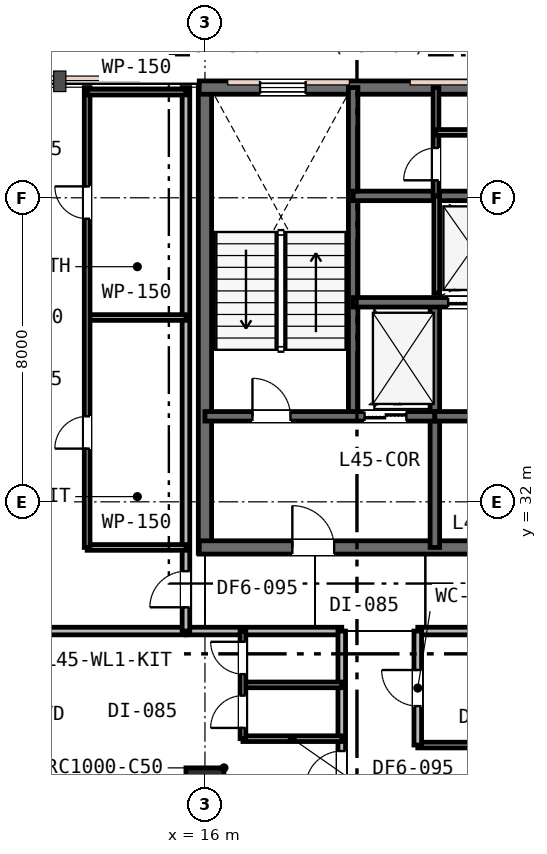
"""IFC4 building model, lengths in metres.
Left out: names, types, materials, properties, quantities, classifications, styles, units other than length and angle.
Written with IfcOpenShell. Run it as: python <this file> out.ifc"""

import sys

from ifc_helpers import new_model, si_unit, direction, frame, frame_2d, origin, origin_2d, place, context, subcontext, project, spatial, rectangle, extrude, element, fill, save


model = new_model("IFC4")
c1 = context("Model", 3, precision=1e-05, world=origin(), true_north=direction((0.0, 1.0)))
c2 = subcontext(c1, "Body", "Model", "MODEL_VIEW")
j1 = project(units=[si_unit("LENGTHUNIT", "METRE"), si_unit("PLANEANGLEUNIT", "RADIAN")], contexts=[c1])
p1 = place(None, origin())
s1 = spatial("IfcSite", under=j1, at=p1, CompositionType="ELEMENT")
p2 = place(p1, origin())
s2 = spatial("IfcBuilding", under=s1, at=p2, CompositionType="ELEMENT")
p3 = place(p2, frame((0.0, 0.0, 175.8)))
s3 = spatial("IfcBuildingStorey", under=s2, at=p3, CompositionType="ELEMENT", Elevation=175.8)
p4 = place(p3, frame((16.0, 30.65, 0.0), z_axis=(0.0, 0.0, 1.0), x_axis=(0.0, 1.0, 0.0)))
e1 = element("IfcWall", 1, at=p4, inside=s3, PredefinedType="SHEAR", context=c2, shape_type="SweptSolid", body=[
    extrude(rectangle(XDim=12.3, YDim=0.35, at=frame_2d((6.15, 0.0))), origin(), (0.0, 0.0, 1.0), 3.6),
])
p5 = place(p3, frame((15.85, 42.9, 0.0), z_axis=(0.0, 0.0, 1.0), x_axis=(1.0, 0.0, 0.0)))
e2 = element("IfcWall", 2, at=p5, inside=s3, PredefinedType="SHEAR", context=c2, shape_type="SweptSolid", body=[
    extrude(rectangle(XDim=24.3, YDim=0.35, at=frame_2d((12.15, 0.0))), origin(), (0.0, 0.0, 1.0), 3.6),
])
p6 = place(p5, frame((1.6, 0.0, 0.95)))
e3 = element("IfcOpeningElement", 3, at=p6, cuts=e2, PredefinedType="OPENING", context=c2, shape_type="SweptSolid", body=[
    extrude(rectangle(XDim=1.2, YDim=1.6, at=frame_2d((0.6, 0.8))), frame((0.0, 0.185, 0.0), z_axis=(0.0, -1.0, 0.0), x_axis=(1.0, 0.0, 0.0)), (0.0, 0.0, 1.0), 0.37),
])
p7 = place(p5, frame((16.5, 0.0, 0.95)))
e4 = element("IfcOpeningElement", 4, at=p7, cuts=e2, PredefinedType="OPENING", context=c2, shape_type="SweptSolid", body=[
    extrude(rectangle(XDim=1.2, YDim=1.6, at=frame_2d((0.6, 0.8))), frame((0.0, 0.185, 0.0), z_axis=(0.0, -1.0, 0.0), x_axis=(1.0, 0.0, 0.0)), (0.0, 0.0, 1.0), 0.37),
])
p8 = place(p5, frame((21.6, 0.0, 0.95)))
e5 = element("IfcOpeningElement", 5, at=p8, cuts=e2, PredefinedType="OPENING", context=c2, shape_type="SweptSolid", body=[
    extrude(rectangle(XDim=1.2, YDim=1.6, at=frame_2d((0.6, 0.8))), frame((0.0, 0.185, 0.0), z_axis=(0.0, -1.0, 0.0), x_axis=(1.0, 0.0, 0.0)), (0.0, 0.0, 1.0), 0.37),
])
p9 = place(p3, frame((15.85, 30.8, 0.0), z_axis=(0.0, 0.0, 1.0), x_axis=(1.0, 0.0, 0.0)))
e6 = element("IfcWall", 6, at=p9, inside=s3, PredefinedType="SHEAR", context=c2, shape_type="SweptSolid", body=[
    extrude(rectangle(XDim=11.2, YDim=0.35, at=frame_2d((5.6, 0.0))), origin(), (0.0, 0.0, 1.0), 3.6),
])
p10 = place(p9, frame((2.45, 0.0, 0.0)))
e7 = element("IfcOpeningElement", 7, at=p10, cuts=e6, PredefinedType="OPENING", context=c2, shape_type="SweptSolid", body=[
    extrude(rectangle(XDim=1.1, YDim=2.15, at=frame_2d((0.55, 1.075))), frame((0.0, 0.185, 0.0), z_axis=(0.0, -1.0, 0.0), x_axis=(1.0, 0.0, 0.0)), (0.0, 0.0, 1.0), 0.37),
])
p11 = place(p3, frame((19.9, 34.25, 0.0), z_axis=(0.0, 0.0, 1.0), x_axis=(0.0, 1.0, 0.0)))
e8 = element("IfcWall", 8, at=p11, inside=s3, PredefinedType="SHEAR", context=c2, shape_type="SweptSolid", body=[
    extrude(rectangle(XDim=8.65, YDim=0.25, at=frame_2d((4.325, 0.0))), origin(), (0.0, 0.0, 1.0), 3.6),
])
p12 = place(p3, frame((22.05, 30.8, 0.0), z_axis=(0.0, 0.0, 1.0), x_axis=(0.0, 1.0, 0.0)))
e9 = element("IfcWall", 9, at=p12, inside=s3, PredefinedType="SHEAR", context=c2, shape_type="SweptSolid", body=[
    extrude(rectangle(XDim=6.45, YDim=0.25, at=frame_2d((3.225, 0.0))), origin(), (0.0, 0.0, 1.0), 3.6),
])
p13 = place(p3, frame((16.0, 34.25, 0.0), z_axis=(0.0, 0.0, 1.0), x_axis=(1.0, 0.0, 0.0)))
e10 = element("IfcWall", 10, at=p13, inside=s3, PredefinedType="SHEAR", context=c2, shape_type="SweptSolid", body=[
    extrude(rectangle(XDim=6.05, YDim=0.25, at=frame_2d((3.025, 0.0))), origin(), (0.0, 0.0, 1.0), 3.6),
])
p14 = place(p13, frame((1.25, 0.0, 0.0)))
e11 = element("IfcOpeningElement", 11, at=p14, cuts=e10, PredefinedType="OPENING", context=c2, shape_type="SweptSolid", body=[
    extrude(rectangle(XDim=1.0, YDim=2.15, at=frame_2d((0.5, 1.075))), frame((0.0, 0.135, 0.0), z_axis=(0.0, -1.0, 0.0), x_axis=(1.0, 0.0, 0.0)), (0.0, 0.0, 1.0), 0.27),
])
p15 = place(p13, frame((4.2, 0.0, 0.0)))
e12 = element("IfcOpeningElement", 12, at=p15, cuts=e10, PredefinedType="OPENING", context=c2, shape_type="SweptSolid", body=[
    extrude(rectangle(XDim=1.1, YDim=2.15, at=frame_2d((0.55, 1.075))), frame((0.0, 0.135, 0.0), z_axis=(0.0, -1.0, 0.0), x_axis=(1.0, 0.0, 0.0)), (0.0, 0.0, 1.0), 0.27),
])
p16 = place(p3, frame((22.05, 34.25, 0.0), z_axis=(0.0, 0.0, 1.0), x_axis=(1.0, 0.0, 0.0)))
e13 = element("IfcWall", 13, at=p16, inside=s3, PredefinedType="SHEAR", context=c2, shape_type="SweptSolid", body=[
    extrude(rectangle(XDim=5.0, YDim=0.25, at=frame_2d((2.5, 0.0))), origin(), (0.0, 0.0, 1.0), 3.6),
])
p17 = place(p16, frame((1.95, 0.0, 0.0)))
e14 = element("IfcOpeningElement", 14, at=p17, cuts=e13, PredefinedType="OPENING", context=c2, shape_type="SweptSolid", body=[
    extrude(rectangle(XDim=1.0, YDim=2.15, at=frame_2d((0.5, 1.075))), frame((0.0, 0.135, 0.0), z_axis=(0.0, -1.0, 0.0), x_axis=(1.0, 0.0, 0.0)), (0.0, 0.0, 1.0), 0.27),
])
p18 = place(p3, frame((19.9, 37.25, 0.0), z_axis=(0.0, 0.0, 1.0), x_axis=(1.0, 0.0, 0.0)))
e15 = element("IfcWall", 15, at=p18, inside=s3, PredefinedType="SHEAR", context=c2, shape_type="SweptSolid", body=[
    extrude(rectangle(XDim=16.2, YDim=0.25, at=frame_2d((8.1, 0.0))), origin(), (0.0, 0.0, 1.0), 3.6),
])
p19 = place(p18, frame((12.55, 0.0, 0.0)))
e16 = element("IfcOpeningElement", 16, at=p19, cuts=e15, PredefinedType="OPENING", context=c2, shape_type="SweptSolid", body=[
    extrude(rectangle(XDim=0.9, YDim=2.15, at=frame_2d((0.45, 1.075))), frame((0.0, 0.135, 0.0), z_axis=(0.0, -1.0, 0.0), x_axis=(1.0, 0.0, 0.0)), (0.0, 0.0, 1.0), 0.27),
])
p20 = place(p18, frame((2.5, 0.0, 0.0)))
e17 = element("IfcOpeningElement", 17, at=p20, cuts=e15, PredefinedType="OPENING", context=c2, shape_type="SweptSolid", body=[
    extrude(rectangle(XDim=1.05, YDim=2.15, at=frame_2d((0.525, 1.075))), frame((0.0, 0.135, 0.0), z_axis=(0.0, -1.0, 0.0), x_axis=(1.0, 0.0, 0.0)), (0.0, 0.0, 1.0), 0.27),
])
p21 = place(p18, frame((4.4, 0.0, 0.0)))
e18 = element("IfcOpeningElement", 18, at=p21, cuts=e15, PredefinedType="OPENING", context=c2, shape_type="SweptSolid", body=[
    extrude(rectangle(XDim=1.05, YDim=2.15, at=frame_2d((0.525, 1.075))), frame((0.0, 0.135, 0.0), z_axis=(0.0, -1.0, 0.0), x_axis=(1.0, 0.0, 0.0)), (0.0, 0.0, 1.0), 0.27),
])
p22 = place(p18, frame((6.3, 0.0, 0.0)))
e19 = element("IfcOpeningElement", 19, at=p22, cuts=e15, PredefinedType="OPENING", context=c2, shape_type="SweptSolid", body=[
    extrude(rectangle(XDim=1.05, YDim=2.15, at=frame_2d((0.525, 1.075))), frame((0.0, 0.135, 0.0), z_axis=(0.0, -1.0, 0.0), x_axis=(1.0, 0.0, 0.0)), (0.0, 0.0, 1.0), 0.27),
])
p23 = place(p3, frame((19.9, 40.05, 0.0), z_axis=(0.0, 0.0, 1.0), x_axis=(1.0, 0.0, 0.0)))
e20 = element("IfcWall", 20, at=p23, inside=s3, PredefinedType="SHEAR", context=c2, shape_type="SweptSolid", body=[
    extrude(rectangle(XDim=12.05, YDim=0.25, at=frame_2d((6.025, 0.0))), origin(), (0.0, 0.0, 1.0), 3.6),
])
p24 = place(p3, frame((16.0, 24.5, 0.0), z_axis=(0.0, 0.0, 1.0), x_axis=(1.0, 0.0, 0.0)))
e21 = element("IfcColumn", 21, at=p24, inside=s3, PredefinedType="COLUMN", context=c2, shape_type="SweptSolid", body=[
    extrude(rectangle(XDim=1.0, YDim=1.0, at=origin_2d()), origin(), (0.0, 0.0, 1.0), 3.6),
])
p25 = place(p3, frame((22.1, 37.49, 0.0), z_axis=(0.0, 0.0, 1.0), x_axis=(0.0, 1.0, 0.0)))
e22 = element("IfcWall", 22, at=p25, inside=s3, PredefinedType="PLUMBINGWALL", context=c2, shape_type="SweptSolid", body=[
    extrude(rectangle(XDim=2.56, YDim=0.15, at=frame_2d((1.28, 0.0))), origin(), (0.0, 0.0, 1.0), 3.33),
])
p26 = place(p3, frame((22.08, 40.05, 0.0), z_axis=(0.0, 0.0, 1.0), x_axis=(0.0, 1.0, 0.0)))
e23 = element("IfcWall", 23, at=p26, inside=s3, PredefinedType="PARTITIONING", context=c2, shape_type="SweptSolid", body=[
    extrude(rectangle(XDim=2.85, YDim=0.15, at=frame_2d((1.425, 0.0))), origin(), (0.0, 0.0, 1.0), 3.33),
])
p27 = place(p26, frame((0.41, 0.0, 0.0)))
e24 = element("IfcOpeningElement", 24, at=p27, cuts=e23, PredefinedType="OPENING", context=c2, shape_type="SweptSolid", body=[
    extrude(rectangle(XDim=0.85, YDim=2.15, at=frame_2d((0.425, 1.075))), frame((0.0, 0.085, 0.0), z_axis=(0.0, -1.0, 0.0), x_axis=(1.0, 0.0, 0.0)), (0.0, 0.0, 1.0), 0.17),
])
p28 = place(p3, frame((22.08, 41.72, 0.0), z_axis=(0.0, 0.0, 1.0), x_axis=(1.0, 0.0, 0.0)))
e25 = element("IfcWall", 25, at=p28, inside=s3, PredefinedType="PARTITIONING", context=c2, shape_type="SweptSolid", body=[
    extrude(rectangle(XDim=11.97, YDim=0.15, at=frame_2d((5.985, 0.0))), origin(), (0.0, 0.0, 1.0), 3.33),
])
p29 = place(p28, frame((5.535, 0.0, 0.0)))
e26 = element("IfcOpeningElement", 26, at=p29, cuts=e25, PredefinedType="OPENING", context=c2, shape_type="SweptSolid", body=[
    extrude(rectangle(XDim=0.9, YDim=2.15, at=frame_2d((0.45, 1.075))), frame((0.0, 0.085, 0.0), z_axis=(0.0, -1.0, 0.0), x_axis=(1.0, 0.0, 0.0)), (0.0, 0.0, 1.0), 0.17),
])
p30 = place(p3, frame((5.1, 28.6, 0.0), z_axis=(0.0, 0.0, 1.0), x_axis=(1.0, 0.0, 0.0)))
e27 = element("IfcWall", 27, at=p30, inside=s3, PredefinedType="PARTITIONING", context=c2, shape_type="SweptSolid", body=[
    extrude(rectangle(XDim=10.4, YDim=0.2, at=frame_2d((5.2, 0.0))), origin(), (0.0, 0.0, 1.0), 2.92),
])
p31 = place(p3, frame((15.5, 28.6, 0.0), z_axis=(0.0, 0.0, 1.0), x_axis=(1.0, 0.0, 0.0)))
e28 = element("IfcWall", 28, at=p31, inside=s3, PredefinedType="PARTITIONING", context=c2, shape_type="SweptSolid", body=[
    extrude(rectangle(XDim=4.1, YDim=0.2, at=frame_2d((2.05, 0.0))), origin(), (0.0, 0.0, 1.0), 2.92),
])
p32 = place(p3, frame((21.6, 28.6, 0.0), z_axis=(0.0, 0.0, 1.0), x_axis=(1.0, 0.0, 0.0)))
e29 = element("IfcWall", 29, at=p32, inside=s3, PredefinedType="PARTITIONING", context=c2, shape_type="SweptSolid", body=[
    extrude(rectangle(XDim=29.3, YDim=0.2, at=frame_2d((14.65, 0.0))), origin(), (0.0, 0.0, 1.0), 2.92),
])
p33 = place(p32, frame((3.293, 0.0, 0.0)))
e30 = element("IfcOpeningElement", 30, at=p33, cuts=e29, PredefinedType="OPENING", context=c2, shape_type="SweptSolid", body=[
    extrude(rectangle(XDim=0.95, YDim=2.15, at=frame_2d((0.475, 1.075))), frame((0.0, 0.11, 0.0), z_axis=(0.0, -1.0, 0.0), x_axis=(1.0, 0.0, 0.0)), (0.0, 0.0, 1.0), 0.22),
])
p34 = place(p32, frame((10.493, 0.0, 0.0)))
e31 = element("IfcOpeningElement", 31, at=p34, cuts=e29, PredefinedType="OPENING", context=c2, shape_type="SweptSolid", body=[
    extrude(rectangle(XDim=0.95, YDim=2.15, at=frame_2d((0.475, 1.075))), frame((0.0, 0.11, 0.0), z_axis=(0.0, -1.0, 0.0), x_axis=(1.0, 0.0, 0.0)), (0.0, 0.0, 1.0), 0.22),
])
p35 = place(p32, frame((19.375, 0.0, 0.0)))
e32 = element("IfcOpeningElement", 32, at=p35, cuts=e29, PredefinedType="OPENING", context=c2, shape_type="SweptSolid", body=[
    extrude(rectangle(XDim=0.95, YDim=2.15, at=frame_2d((0.475, 1.075))), frame((0.0, 0.11, 0.0), z_axis=(0.0, -1.0, 0.0), x_axis=(1.0, 0.0, 0.0)), (0.0, 0.0, 1.0), 0.22),
])
p36 = place(p3, frame((15.5, 28.6, 0.0), z_axis=(0.0, 0.0, 1.0), x_axis=(0.0, 1.0, 0.0)))
e33 = element("IfcWall", 33, at=p36, inside=s3, PredefinedType="PARTITIONING", context=c2, shape_type="SweptSolid", body=[
    extrude(rectangle(XDim=14.3, YDim=0.2, at=frame_2d((7.15, 0.0))), origin(), (0.0, 0.0, 1.0), 2.92),
])
p37 = place(p36, frame((0.625, 0.0, 0.0)))
e34 = element("IfcOpeningElement", 34, at=p37, cuts=e33, PredefinedType="OPENING", context=c2, shape_type="SweptSolid", body=[
    extrude(rectangle(XDim=0.95, YDim=2.15, at=frame_2d((0.475, 1.075))), frame((0.0, 0.11, 0.0), z_axis=(0.0, -1.0, 0.0), x_axis=(1.0, 0.0, 0.0)), (0.0, 0.0, 1.0), 0.22),
])
p38 = place(p3, frame((12.9, 30.8, 0.0), z_axis=(0.0, 0.0, 1.0), x_axis=(1.0, 0.0, 0.0)))
e35 = element("IfcWall", 35, at=p38, inside=s3, PredefinedType="PARTITIONING", context=c2, shape_type="SweptSolid", body=[
    extrude(rectangle(XDim=2.6, YDim=0.15, at=frame_2d((1.3, 0.0))), origin(), (0.0, 0.0, 1.0), 2.92),
])
p39 = place(p3, frame((12.9, 36.85, 0.0), z_axis=(0.0, 0.0, 1.0), x_axis=(1.0, 0.0, 0.0)))
e36 = element("IfcWall", 36, at=p39, inside=s3, PredefinedType="PARTITIONING", context=c2, shape_type="SweptSolid", body=[
    extrude(rectangle(XDim=2.6, YDim=0.15, at=frame_2d((1.3, 0.0))), origin(), (0.0, 0.0, 1.0), 3.33),
])
p40 = place(p3, frame((12.9, 30.8, 0.0), z_axis=(0.0, 0.0, 1.0), x_axis=(0.0, 1.0, 0.0)))
e37 = element("IfcWall", 37, at=p40, inside=s3, PredefinedType="PARTITIONING", context=c2, shape_type="SweptSolid", body=[
    extrude(rectangle(XDim=12.1, YDim=0.15, at=frame_2d((6.05, 0.0))), origin(), (0.0, 0.0, 1.0), 2.92),
])
p41 = place(p40, frame((2.6, 0.0, 0.0)))
e38 = element("IfcOpeningElement", 38, at=p41, cuts=e37, PredefinedType="OPENING", context=c2, shape_type="SweptSolid", body=[
    extrude(rectangle(XDim=0.85, YDim=2.15, at=frame_2d((0.425, 1.075))), frame((0.0, 0.085, 0.0), z_axis=(0.0, -1.0, 0.0), x_axis=(1.0, 0.0, 0.0)), (0.0, 0.0, 1.0), 0.17),
])
p42 = place(p40, frame((8.65, 0.0, 0.0)))
e39 = element("IfcOpeningElement", 39, at=p42, cuts=e37, PredefinedType="OPENING", context=c2, shape_type="SweptSolid", body=[
    extrude(rectangle(XDim=0.85, YDim=2.15, at=frame_2d((0.425, 1.075))), frame((0.0, 0.085, 0.0), z_axis=(0.0, -1.0, 0.0), x_axis=(1.0, 0.0, 0.0)), (0.0, 0.0, 1.0), 0.17),
])
p43 = place(p3, frame((12.9, 42.78, 0.0), z_axis=(0.0, 0.0, 1.0), x_axis=(1.0, 0.0, 0.0)))
e40 = element("IfcWall", 40, at=p43, inside=s3, PredefinedType="PARTITIONING", context=c2, shape_type="SweptSolid", body=[
    extrude(rectangle(XDim=2.6, YDim=0.15, at=frame_2d((1.3, 0.0))), origin(), (0.0, 0.0, 1.0), 3.33),
])
p44 = place(p3, frame((19.6, 17.0, 0.0), z_axis=(0.0, 0.0, 1.0), x_axis=(0.0, 1.0, 0.0)))
e41 = element("IfcWall", 41, at=p44, inside=s3, PredefinedType="PARTITIONING", context=c2, shape_type="SweptSolid", body=[
    extrude(rectangle(XDim=11.6, YDim=0.2, at=frame_2d((5.8, 0.0))), origin(), (0.0, 0.0, 1.0), 2.92),
])
p45 = place(p44, frame((7.493, 0.0, 0.0)))
e42 = element("IfcOpeningElement", 42, at=p45, cuts=e41, PredefinedType="OPENING", context=c2, shape_type="SweptSolid", body=[
    extrude(rectangle(XDim=0.95, YDim=2.15, at=frame_2d((0.475, 1.075))), frame((0.0, 0.11, 0.0), z_axis=(0.0, -1.0, 0.0), x_axis=(1.0, 0.0, 0.0)), (0.0, 0.0, 1.0), 0.22),
])
p46 = place(p44, frame((0.909, 0.0, 0.0)))
e43 = element("IfcOpeningElement", 43, at=p46, cuts=e41, PredefinedType="OPENING", context=c2, shape_type="SweptSolid", body=[
    extrude(rectangle(XDim=0.95, YDim=2.15, at=frame_2d((0.475, 1.075))), frame((0.0, 0.11, 0.0), z_axis=(0.0, -1.0, 0.0), x_axis=(1.0, 0.0, 0.0)), (0.0, 0.0, 1.0), 0.22),
])
for number, where, z_axis, x_axis in (
    (44, (17.0, 25.768, 0.0), (0.0, 0.0, 1.0), (1.0, 0.0, 0.0)),
    (45, (17.0, 27.184, 0.0), (0.0, 0.0, 1.0), (1.0, 0.0, 0.0)),
):
    element("IfcWall", number, at=place(p3, frame(where, z_axis=z_axis, x_axis=x_axis)), inside=s3, PredefinedType="PARTITIONING", context=c2, shape_type="SweptSolid", body=[
        extrude(rectangle(XDim=2.6, YDim=0.15, at=frame_2d((1.3, 0.0))), origin(), (0.0, 0.0, 1.0), 3.07),
    ])
p47 = place(p3, frame((17.0, 25.768, 0.0), z_axis=(0.0, 0.0, 1.0), x_axis=(0.0, 1.0, 0.0)))
e46 = element("IfcWall", 46, at=p47, inside=s3, PredefinedType="PARTITIONING", context=c2, shape_type="SweptSolid", body=[
    extrude(rectangle(XDim=2.832, YDim=0.15, at=frame_2d((1.416, 0.0))), origin(), (0.0, 0.0, 1.0), 3.33),
])
p48 = place(p47, frame((0.283, 0.0, 0.0)))
e47 = element("IfcOpeningElement", 47, at=p48, cuts=e46, PredefinedType="OPENING", context=c2, shape_type="SweptSolid", body=[
    extrude(rectangle(XDim=0.85, YDim=2.15, at=frame_2d((0.425, 1.075))), frame((0.0, 0.085, 0.0), z_axis=(0.0, -1.0, 0.0), x_axis=(1.0, 0.0, 0.0)), (0.0, 0.0, 1.0), 0.17),
])
p49 = place(p47, frame((1.699, 0.0, 0.0)))
e48 = element("IfcOpeningElement", 48, at=p49, cuts=e46, PredefinedType="OPENING", context=c2, shape_type="SweptSolid", body=[
    extrude(rectangle(XDim=0.85, YDim=2.15, at=frame_2d((0.425, 1.075))), frame((0.0, 0.085, 0.0), z_axis=(0.0, -1.0, 0.0), x_axis=(1.0, 0.0, 0.0)), (0.0, 0.0, 1.0), 0.17),
])
p50 = place(p3, frame((21.6, 25.6, 0.0), z_axis=(0.0, 0.0, 1.0), x_axis=(1.0, 0.0, 0.0)))
e49 = element("IfcWall", 49, at=p50, inside=s3, PredefinedType="PARTITIONING", context=c2, shape_type="SweptSolid", body=[
    extrude(rectangle(XDim=2.3, YDim=0.15, at=frame_2d((1.15, 0.0))), origin(), (0.0, 0.0, 1.0), 2.92),
])
p51 = place(p3, frame((21.6, 25.6, 0.0), z_axis=(0.0, 0.0, 1.0), x_axis=(0.0, 1.0, 0.0)))
e50 = element("IfcWall", 50, at=p51, inside=s3, PredefinedType="PARTITIONING", context=c2, shape_type="SweptSolid", body=[
    extrude(rectangle(XDim=3.0, YDim=0.2, at=frame_2d((1.5, 0.0))), origin(), (0.0, 0.0, 1.0), 3.07),
])
p52 = place(p51, frame((1.025, 0.0, 0.0)))
e51 = element("IfcOpeningElement", 51, at=p52, cuts=e50, PredefinedType="OPENING", context=c2, shape_type="SweptSolid", body=[
    extrude(rectangle(XDim=0.95, YDim=2.15, at=frame_2d((0.475, 1.075))), frame((0.0, 0.11, 0.0), z_axis=(0.0, -1.0, 0.0), x_axis=(1.0, 0.0, 0.0)), (0.0, 0.0, 1.0), 0.22),
])
p53 = place(p6, origin())
e52 = element("IfcWindow", 52, at=p53, inside=s3, PartitioningType="SINGLE_PANEL", PredefinedType="WINDOW", context=c2, shape_type="SweptSolid", body=[
    extrude(rectangle(XDim=1.2, YDim=1.6, at=frame_2d((0.6, 0.8))), frame((0.0, 0.03, 0.0), z_axis=(0.0, -1.0, 0.0), x_axis=(1.0, 0.0, 0.0)), (0.0, 0.0, 1.0), 0.06),
])
fill(e3, e52)
p54 = place(p14, origin())
e53 = element("IfcDoor", 53, at=p54, inside=s3, OperationType="SINGLE_SWING_LEFT", PredefinedType="DOOR", context=c2, shape_type="SweptSolid", body=[
    extrude(rectangle(XDim=1.0, YDim=2.15, at=frame_2d((0.5, 1.075))), frame((0.0, 0.025, 0.0), z_axis=(0.0, -1.0, 0.0), x_axis=(1.0, 0.0, 0.0)), (0.0, 0.0, 1.0), 0.05),
])
fill(e11, e53)
p55 = place(p10, origin())
e54 = element("IfcDoor", 54, at=p55, inside=s3, OperationType="SINGLE_SWING_LEFT", PredefinedType="DOOR", context=c2, shape_type="SweptSolid", body=[
    extrude(rectangle(XDim=1.1, YDim=2.15, at=frame_2d((0.55, 1.075))), frame((0.0, 0.025, 0.0), z_axis=(0.0, -1.0, 0.0), x_axis=(1.0, 0.0, 0.0)), (0.0, 0.0, 1.0), 0.05),
])
fill(e7, e54)
p56 = place(p27, origin())
e55 = element("IfcDoor", 55, at=p56, inside=s3, OperationType="SINGLE_SWING_LEFT", PredefinedType="DOOR", context=c2, shape_type="SweptSolid", body=[
    extrude(rectangle(XDim=0.85, YDim=2.15, at=frame_2d((0.425, 1.075))), frame((0.0, 0.025, 0.0), z_axis=(0.0, -1.0, 0.0), x_axis=(1.0, 0.0, 0.0)), (0.0, 0.0, 1.0), 0.05),
])
fill(e24, e55)
p57 = place(p37, origin())
e56 = element("IfcDoor", 56, at=p57, inside=s3, OperationType="SINGLE_SWING_LEFT", PredefinedType="DOOR", context=c2, shape_type="SweptSolid", body=[
    extrude(rectangle(XDim=0.95, YDim=2.15, at=frame_2d((0.475, 1.075))), frame((0.0, 0.025, 0.0), z_axis=(0.0, -1.0, 0.0), x_axis=(1.0, 0.0, 0.0)), (0.0, 0.0, 1.0), 0.05),
])
fill(e34, e56)
p58 = place(p41, origin())
e57 = element("IfcDoor", 57, at=p58, inside=s3, OperationType="SINGLE_SWING_LEFT", PredefinedType="DOOR", context=c2, shape_type="SweptSolid", body=[
    extrude(rectangle(XDim=0.85, YDim=2.15, at=frame_2d((0.425, 1.075))), frame((0.0, 0.025, 0.0), z_axis=(0.0, -1.0, 0.0), x_axis=(1.0, 0.0, 0.0)), (0.0, 0.0, 1.0), 0.05),
])
fill(e38, e57)
p59 = place(p42, origin())
e58 = element("IfcDoor", 58, at=p59, inside=s3, OperationType="SINGLE_SWING_RIGHT", PredefinedType="DOOR", context=c2, shape_type="SweptSolid", body=[
    extrude(rectangle(XDim=0.85, YDim=2.15, at=frame_2d((0.425, 1.075))), frame((0.0, 0.025, 0.0), z_axis=(0.0, -1.0, 0.0), x_axis=(1.0, 0.0, 0.0)), (0.0, 0.0, 1.0), 0.05),
])
fill(e39, e58)
p60 = place(p45, origin())
e59 = element("IfcDoor", 59, at=p60, inside=s3, OperationType="SINGLE_SWING_LEFT", PredefinedType="DOOR", context=c2, shape_type="SweptSolid", body=[
    extrude(rectangle(XDim=0.95, YDim=2.15, at=frame_2d((0.475, 1.075))), frame((0.0, 0.025, 0.0), z_axis=(0.0, -1.0, 0.0), x_axis=(1.0, 0.0, 0.0)), (0.0, 0.0, 1.0), 0.05),
])
fill(e42, e59)
p61 = place(p48, origin())
e60 = element("IfcDoor", 60, at=p61, inside=s3, OperationType="SINGLE_SWING_LEFT", PredefinedType="DOOR", context=c2, shape_type="SweptSolid", body=[
    extrude(rectangle(XDim=0.85, YDim=2.15, at=frame_2d((0.425, 1.075))), frame((0.0, 0.025, 0.0), z_axis=(0.0, -1.0, 0.0), x_axis=(1.0, 0.0, 0.0)), (0.0, 0.0, 1.0), 0.05),
])
fill(e47, e60)
p62 = place(p49, origin())
e61 = element("IfcDoor", 61, at=p62, inside=s3, OperationType="SINGLE_SWING_RIGHT", PredefinedType="DOOR", context=c2, shape_type="SweptSolid", body=[
    extrude(rectangle(XDim=0.85, YDim=2.15, at=frame_2d((0.425, 1.075))), frame((0.0, 0.025, 0.0), z_axis=(0.0, -1.0, 0.0), x_axis=(1.0, 0.0, 0.0)), (0.0, 0.0, 1.0), 0.05),
])
fill(e48, e61)
p63 = place(p52, origin())
e62 = element("IfcDoor", 62, at=p63, inside=s3, OperationType="SINGLE_SWING_RIGHT", PredefinedType="DOOR", context=c2, shape_type="SweptSolid", body=[
    extrude(rectangle(XDim=0.95, YDim=2.15, at=frame_2d((0.475, 1.075))), frame((0.0, 0.025, 0.0), z_axis=(0.0, -1.0, 0.0), x_axis=(1.0, 0.0, 0.0)), (0.0, 0.0, 1.0), 0.05),
])
fill(e51, e62)
p64 = place(p15, origin())
e63 = element("IfcDoor", 63, at=p64, inside=s3, OperationType="DOUBLE_DOOR_SLIDING", PredefinedType="DOOR", context=c2, shape_type="SweptSolid", body=[
    extrude(rectangle(XDim=1.1, YDim=2.15, at=frame_2d((0.55, 1.075))), frame((0.0, 0.025, 0.0), z_axis=(0.0, -1.0, 0.0), x_axis=(1.0, 0.0, 0.0)), (0.0, 0.0, 1.0), 0.05),
])
fill(e12, e63)
p65 = place(p20, origin())
e64 = element("IfcDoor", 64, at=p65, inside=s3, OperationType="DOUBLE_DOOR_SLIDING", PredefinedType="DOOR", context=c2, shape_type="SweptSolid", body=[
    extrude(rectangle(XDim=1.05, YDim=2.15, at=frame_2d((0.525, 1.075))), frame((0.0, 0.025, 0.0), z_axis=(0.0, -1.0, 0.0), x_axis=(1.0, 0.0, 0.0)), (0.0, 0.0, 1.0), 0.05),
])
fill(e17, e64)
save(model, sys.argv[1])
